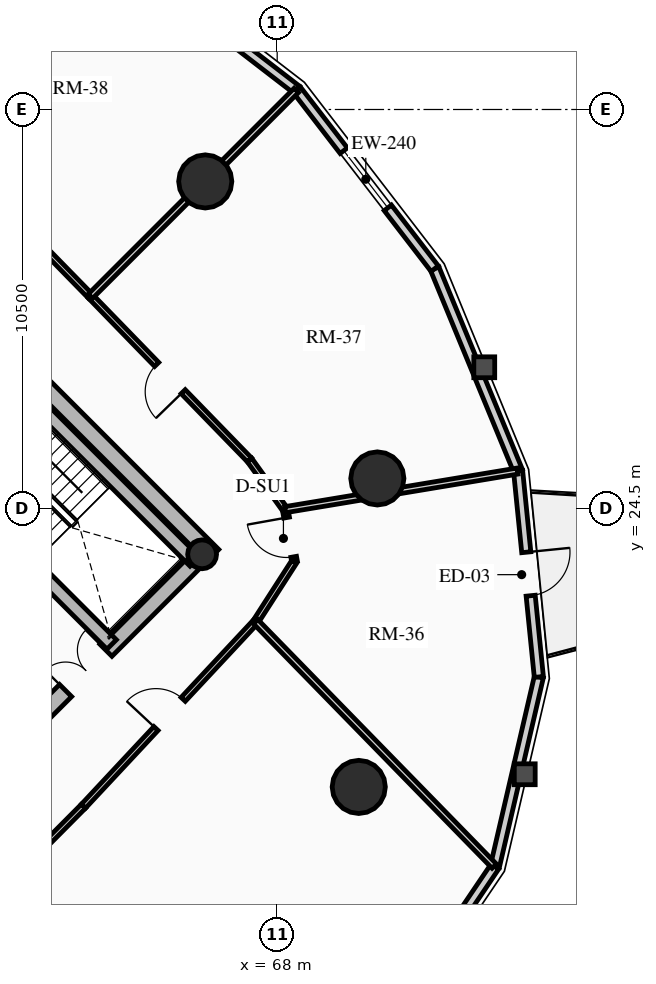
"""IFC4 building model, lengths in metres.
Left out: names, types, materials, properties, quantities, classifications, styles, units other than length and angle.
Written with IfcOpenShell. Run it as: python <this file> out.ifc"""

import sys

from ifc_helpers import new_model, si_unit, direction, frame, frame_2d, origin, origin_2d, place, context, subcontext, project, spatial, rectangle, circle, hollow_circle, extrude, source, transform, mapped, element, fill, save


model = new_model("IFC4")
c1 = context("Model", 3, precision=1e-05, world=origin(), true_north=direction((0.0, 1.0)))
c2 = subcontext(c1, "Body", "Model", "MODEL_VIEW")
j1 = project(units=[si_unit("LENGTHUNIT", "METRE"), si_unit("PLANEANGLEUNIT", "RADIAN")], contexts=[c1])
p1 = place(None, origin())
s1 = spatial("IfcSite", under=j1, at=p1, CompositionType="ELEMENT")
p2 = place(p1, origin())
s2 = spatial("IfcBuilding", under=s1, at=p2, CompositionType="ELEMENT")
p3 = place(p2, frame((0.0, 0.0, 78.88)))
s3 = spatial("IfcBuildingStorey", under=s2, at=p3, CompositionType="ELEMENT", Elevation=78.88)
p4 = place(p3, frame((66.303, 23.263, 0.0), z_axis=(0.0, 0.0, 1.0), x_axis=(-0.707106781187, 0.707106781187, 0.0)))
e1 = element("IfcWall", 1, at=p4, inside=s3, PredefinedType="SHEAR", context=c2, shape_type="SweptSolid", body=[
    extrude(rectangle(XDim=14.2, YDim=0.45, at=frame_2d((7.1, 0.0))), origin(), (0.0, 0.0, 1.0), 2.91),
])
p5 = place(p3, frame((58.578, 15.856, 0.0), z_axis=(0.0, 0.0, 1.0), x_axis=(0.707106781187, 0.707106781187, 0.0)))
e2 = element("IfcWall", 2, at=p5, inside=s3, PredefinedType="SHEAR", context=c2, shape_type="SweptSolid", body=[
    extrude(rectangle(XDim=10.7, YDim=0.45, at=frame_2d((5.35, 0.0))), origin(), (0.0, 0.0, 1.0), 2.91),
])
m1 = source(origin(), c2, "Body", "SweptSolid", [
    extrude(rectangle(XDim=1.5, YDim=2.02, at=frame_2d((0.75, 1.01))), frame((0.0, 0.235, 0.0), z_axis=(0.0, -1.0, 0.0), x_axis=(1.0, 0.0, 0.0)), (0.0, 0.0, 1.0), 0.47),
])
p6 = place(p5, frame((5.45, 0.0, 0.0)))
e3 = element("IfcOpeningElement", 3, at=p6, cuts=e2, PredefinedType="OPENING", context=c2, shape_type="MappedRepresentation", body=[
    mapped(m1, transform((0.0, 0.0, 0.0), x_axis=(1.0, 0.0, 0.0), y_axis=(0.0, 1.0, 0.0), z_axis=(0.0, 0.0, 1.0), scale=1.0)),
])
p7 = place(p3, frame((63.645, 20.922, 0.0), z_axis=(0.0, 0.0, 1.0), x_axis=(-0.707106781187, 0.707106781187, 0.0)))
e4 = element("IfcWall", 4, at=p7, inside=s3, PredefinedType="SHEAR", context=c2, shape_type="SweptSolid", body=[
    extrude(rectangle(XDim=13.75, YDim=0.35, at=frame_2d((6.875, 0.0))), origin(), (0.0, 0.0, 1.0), 2.91),
])
m2 = source(origin(), c2, "Body", "SweptSolid", [
    extrude(rectangle(XDim=1.1, YDim=2.015, at=frame_2d((0.55, 1.007))), frame((0.0, 0.185, 0.0), z_axis=(0.0, -1.0, 0.0), x_axis=(1.0, 0.0, 0.0)), (0.0, 0.0, 1.0), 0.37),
])
p8 = place(p7, frame((10.0, 0.0, 0.0)))
e5 = element("IfcOpeningElement", 5, at=p8, cuts=e4, PredefinedType="OPENING", context=c2, shape_type="MappedRepresentation", body=[
    mapped(m2, transform((0.0, 0.0, 0.0), x_axis=(1.0, 0.0, 0.0), y_axis=(0.0, 1.0, 0.0), z_axis=(0.0, 0.0, 1.0), scale=1.0)),
])
p9 = place(p7, frame((12.0, 0.0, 0.0)))
e6 = element("IfcOpeningElement", 6, at=p9, cuts=e4, PredefinedType="OPENING", context=c2, shape_type="MappedRepresentation", body=[
    mapped(m2, transform((0.0, 0.0, 0.0), x_axis=(1.0, 0.0, 0.0), y_axis=(0.0, 1.0, 0.0), z_axis=(0.0, 0.0, 1.0), scale=1.0)),
])
m3 = source(origin(), c2, "Body", "SweptSolid", [
    extrude(rectangle(XDim=1.15, YDim=2.02, at=frame_2d((0.575, 1.01))), frame((0.0, 0.185, 0.0), z_axis=(0.0, -1.0, 0.0), x_axis=(1.0, 0.0, 0.0)), (0.0, 0.0, 1.0), 0.37),
])
p10 = place(p7, frame((5.305, 0.0, 0.0)))
e7 = element("IfcOpeningElement", 7, at=p10, cuts=e4, PredefinedType="OPENING", context=c2, shape_type="MappedRepresentation", body=[
    mapped(m3, transform((0.0, 0.0, 0.0), x_axis=(1.0, 0.0, 0.0), y_axis=(0.0, 1.0, 0.0), z_axis=(0.0, 0.0, 1.0), scale=1.0)),
])
p11 = place(p3, frame((65.83, 23.107, 0.0), z_axis=(0.0, 0.0, 1.0), x_axis=(-0.707088616009, 0.707124945897, 0.0)))
e8 = element("IfcWall", 8, at=p11, inside=s3, PredefinedType="SHEAR", context=c2, shape_type="SweptSolid", body=[
    extrude(rectangle(XDim=6.72, YDim=0.35, at=frame_2d((3.36, 0.0))), origin(), (0.0, 0.0, 1.0), 2.91),
])
p12 = place(p3, frame((66.024, 23.294, 0.0), z_axis=(0.0, 0.0, 1.0), x_axis=(0.707106781187, 0.707106781187, 0.0)))
e9 = element("IfcColumn", 9, at=p12, inside=s3, PredefinedType="COLUMN", context=c2, shape_type="SweptSolid", body=[
    extrude(hollow_circle(Radius=0.38, WallThickness=0.032, at=origin_2d()), origin(), (0.0, 0.0, 1.0), 2.91),
])
for number, where, z_axis, x_axis in (
    (10, (66.107, 33.107, 0.0), (0.0, 0.0, 1.0), (1.0, 0.0, 0.0)),
    (11, (70.146, 17.173, 0.0), (0.0, 0.0, 1.0), (1.0, 0.0, 0.0)),
    (12, (70.635, 25.291, 0.0), (0.0, 0.0, 1.0), (1.0, 0.0, 0.0)),
):
    element("IfcColumn", number, at=place(p3, frame(where, z_axis=z_axis, x_axis=x_axis)), inside=s3, PredefinedType="USERDEFINED", context=c2, shape_type="SweptSolid", body=[
        extrude(circle(Radius=0.7, at=origin_2d()), origin(), (0.0, 0.0, 1.0), 2.91),
    ])
p13 = place(p3, frame((63.811, 39.145, 0.0), z_axis=(0.0, 0.0, 1.0), x_axis=(0.791982052206, -0.61054437102, 0.0)))
e13 = element("IfcWall", 13, at=p13, inside=s3, PredefinedType="SOLIDWALL", context=c2, shape_type="SweptSolid", body=[
    extrude(rectangle(XDim=5.942, YDim=0.24, at=frame_2d((2.971, 0.0))), origin(), (0.0, 0.0, 1.0), 2.179),
])
p14 = place(p3, frame((73.729, 15.08, 0.0), z_axis=(0.0, 0.0, 1.0), x_axis=(-0.559572880421, -0.828781148131, 0.0)))
e14 = element("IfcWall", 14, at=p14, inside=s3, PredefinedType="SOLIDWALL", context=c2, shape_type="SweptSolid", body=[
    extrude(rectangle(XDim=4.905, YDim=0.24, at=frame_2d((2.452, 0.0))), origin(), (0.0, 0.0, 1.0), 2.179),
])
m4 = source(origin(), c2, "Body", "SweptSolid", [
    extrude(rectangle(XDim=2.2, YDim=1.35, at=frame_2d((1.1, 0.675))), frame((0.0, 0.13, 0.0), z_axis=(0.0, -1.0, 0.0), x_axis=(1.0, 0.0, 0.0)), (0.0, 0.0, 1.0), 0.26),
])
p15 = place(p14, frame((1.352, 0.0, 0.65)))
e15 = element("IfcOpeningElement", 15, at=p15, cuts=e14, PredefinedType="OPENING", context=c2, shape_type="MappedRepresentation", body=[
    mapped(m4, transform((0.0, 0.0, 0.0), x_axis=(1.0, 0.0, 0.0), y_axis=(0.0, 1.0, 0.0), z_axis=(0.0, 0.0, 1.0), scale=1.0)),
])
p16 = place(p3, frame((74.885, 20.067, 0.0), z_axis=(0.0, 0.0, 1.0), x_axis=(-0.225834725257, -0.974165631126, 0.0)))
e16 = element("IfcWall", 16, at=p16, inside=s3, PredefinedType="SOLIDWALL", context=c2, shape_type="SweptSolid", body=[
    extrude(rectangle(XDim=5.119, YDim=0.24, at=frame_2d((2.56, 0.0))), origin(), (0.0, 0.0, 1.0), 2.179),
])
p17 = place(p3, frame((74.339, 25.487, 0.0), z_axis=(0.0, 0.0, 1.0), x_axis=(0.10015591906, -0.994971754311, 0.0)))
e17 = element("IfcWall", 17, at=p17, inside=s3, PredefinedType="SOLIDWALL", context=c2, shape_type="SweptSolid", body=[
    extrude(rectangle(XDim=5.448, YDim=0.24, at=frame_2d((2.724, 0.0))), origin(), (0.0, 0.0, 1.0), 2.179),
])
m5 = source(origin(), c2, "Body", "SweptSolid", [
    extrude(rectangle(XDim=1.15, YDim=2.005, at=frame_2d((0.575, 1.002))), frame((0.0, 0.13, 0.0), z_axis=(0.0, -1.0, 0.0), x_axis=(1.0, 0.0, 0.0)), (0.0, 0.0, 1.0), 0.26),
])
p18 = place(p17, frame((2.149, 0.0, 0.0)))
e18 = element("IfcOpeningElement", 18, at=p18, cuts=e17, PredefinedType="OPENING", context=c2, shape_type="MappedRepresentation", body=[
    mapped(m5, transform((0.0, 0.0, 0.0), x_axis=(1.0, 0.0, 0.0), y_axis=(0.0, 1.0, 0.0), z_axis=(0.0, 0.0, 1.0), scale=1.0)),
])
p19 = place(p3, frame((72.145, 30.811, 0.0), z_axis=(0.0, 0.0, 1.0), x_axis=(0.381027003055, -0.924563909604, 0.0)))
e19 = element("IfcWall", 19, at=p19, inside=s3, PredefinedType="SOLIDWALL", context=c2, shape_type="SweptSolid", body=[
    extrude(rectangle(XDim=5.758, YDim=0.24, at=frame_2d((2.879, 0.0))), origin(), (0.0, 0.0, 1.0), 2.179),
])
p20 = place(p3, frame((68.517, 35.517, 0.0), z_axis=(0.0, 0.0, 1.0), x_axis=(0.61054437102, -0.791982052206, 0.0)))
e20 = element("IfcWall", 20, at=p20, inside=s3, PredefinedType="SOLIDWALL", context=c2, shape_type="SweptSolid", body=[
    extrude(rectangle(XDim=5.942, YDim=0.24, at=frame_2d((2.971, 0.0))), origin(), (0.0, 0.0, 1.0), 2.179),
])
m6 = source(origin(), c2, "Body", "SweptSolid", [
    extrude(rectangle(XDim=1.9, YDim=1.35, at=frame_2d((0.95, 0.675))), frame((0.0, 0.13, 0.0), z_axis=(0.0, -1.0, 0.0), x_axis=(1.0, 0.0, 0.0)), (0.0, 0.0, 1.0), 0.26),
])
p21 = place(p20, frame((2.021, 0.0, 0.65)))
e21 = element("IfcOpeningElement", 21, at=p21, cuts=e20, PredefinedType="OPENING", context=c2, shape_type="MappedRepresentation", body=[
    mapped(m6, transform((0.0, 0.0, 0.0), x_axis=(1.0, 0.0, 0.0), y_axis=(0.0, 1.0, 0.0), z_axis=(0.0, 0.0, 1.0), scale=1.0)),
])
p22 = place(p3, frame((63.086, 30.086, 0.0), z_axis=(0.0, 0.0, 1.0), x_axis=(-0.699075897379, 0.715047473741, 0.0)))
e22 = element("IfcWall", 22, at=p22, inside=s3, PredefinedType="PARTITIONING", context=c2, shape_type="SweptSolid", body=[
    extrude(rectangle(XDim=6.114, YDim=0.15, at=frame_2d((3.057, 0.0))), origin(), (0.0, 0.0, 1.0), 2.225),
])
p23 = place(p3, frame((60.562, 14.31, 0.0), z_axis=(0.0, 0.0, 1.0), x_axis=(0.704566236161, 0.709638230975, 0.0)))
e23 = element("IfcWall", 23, at=p23, inside=s3, PredefinedType="PARTITIONING", context=c2, shape_type="SweptSolid", body=[
    extrude(rectangle(XDim=3.321, YDim=0.15, at=frame_2d((1.661, 0.0))), origin(), (0.0, 0.0, 1.0), 2.225),
])
p24 = place(p3, frame((62.903, 16.667, 0.0), z_axis=(0.0, 0.0, 1.0), x_axis=(0.682371947497, 0.731005147225, 0.0)))
e24 = element("IfcWall", 24, at=p24, inside=s3, PredefinedType="PARTITIONING", context=c2, shape_type="SweptSolid", body=[
    extrude(rectangle(XDim=6.642, YDim=0.15, at=frame_2d((3.321, 0.0))), origin(), (0.0, 0.0, 1.0), 2.225),
])
m7 = source(origin(), c2, "Body", "SweptSolid", [
    extrude(rectangle(XDim=1.05, YDim=2.015, at=frame_2d((0.525, 1.007))), frame((0.0, 0.085, 0.0), z_axis=(0.0, -1.0, 0.0), x_axis=(1.0, 0.0, 0.0)), (0.0, 0.0, 1.0), 0.17),
])
p25 = place(p24, frame((2.796, 0.0, 0.0)))
e25 = element("IfcOpeningElement", 25, at=p25, cuts=e24, PredefinedType="OPENING", context=c2, shape_type="MappedRepresentation", body=[
    mapped(m7, transform((0.0, 0.0, 0.0), x_axis=(1.0, 0.0, 0.0), y_axis=(0.0, 1.0, 0.0), z_axis=(0.0, 0.0, 1.0), scale=1.0)),
])
p26 = place(p3, frame((67.435, 21.521, 0.0), z_axis=(0.0, 0.0, 1.0), x_axis=(0.540777197838, 0.841165870859, 0.0)))
e26 = element("IfcWall", 26, at=p26, inside=s3, PredefinedType="PARTITIONING", context=c2, shape_type="SweptSolid", body=[
    extrude(rectangle(XDim=1.888, YDim=0.15, at=frame_2d((0.944, 0.0))), origin(), (0.0, 0.0, 1.0), 2.225),
])
p27 = place(p3, frame((68.456, 23.11, 0.0), z_axis=(0.0, 0.0, 1.0), x_axis=(-0.1772522795, 0.984165448191, 0.0)))
e27 = element("IfcWall", 27, at=p27, inside=s3, PredefinedType="PARTITIONING", context=c2, shape_type="SweptSolid", body=[
    extrude(rectangle(XDim=1.382, YDim=0.15, at=frame_2d((0.691, 0.0))), origin(), (0.0, 0.0, 1.0), 2.225),
])
p28 = place(p27, frame((0.12, 0.0, 0.0)))
e28 = element("IfcOpeningElement", 28, at=p28, cuts=e27, PredefinedType="OPENING", context=c2, shape_type="MappedRepresentation", body=[
    mapped(m7, transform((0.0, 0.0, 0.0), x_axis=(1.0, 0.0, 0.0), y_axis=(0.0, 1.0, 0.0), z_axis=(0.0, 0.0, 1.0), scale=1.0)),
])
p29 = place(p3, frame((68.211, 24.469, 0.0), z_axis=(0.0, 0.0, 1.0), x_axis=(-0.583012141368, 0.812463441034, 0.0)))
e29 = element("IfcWall", 29, at=p29, inside=s3, PredefinedType="PARTITIONING", context=c2, shape_type="SweptSolid", body=[
    extrude(rectangle(XDim=1.613, YDim=0.15, at=frame_2d((0.807, 0.0))), origin(), (0.0, 0.0, 1.0), 2.225),
])
p30 = place(p3, frame((67.27, 25.78, 0.0), z_axis=(0.0, 0.0, 1.0), x_axis=(-0.696847842907, 0.717218992942, 0.0)))
e30 = element("IfcWall", 30, at=p30, inside=s3, PredefinedType="PARTITIONING", context=c2, shape_type="SweptSolid", body=[
    extrude(rectangle(XDim=6.004, YDim=0.15, at=frame_2d((3.002, 0.0))), origin(), (0.0, 0.0, 1.0), 2.655),
])
m8 = source(origin(), c2, "Body", "SweptSolid", [
    extrude(rectangle(XDim=1.0, YDim=2.015, at=frame_2d((0.5, 1.007))), frame((0.0, 0.085, 0.0), z_axis=(0.0, -1.0, 0.0), x_axis=(1.0, 0.0, 0.0)), (0.0, 0.0, 1.0), 0.17),
])
p31 = place(p30, frame((2.502, 0.0, 0.0)))
e31 = element("IfcOpeningElement", 31, at=p31, cuts=e30, PredefinedType="OPENING", context=c2, shape_type="MappedRepresentation", body=[
    mapped(m8, transform((0.0, 0.0, 0.0), x_axis=(1.0, 0.0, 0.0), y_axis=(0.0, 1.0, 0.0), z_axis=(0.0, 0.0, 1.0), scale=1.0)),
])
p32 = place(p3, frame((63.086, 30.086, 0.0), z_axis=(0.0, 0.0, 1.0), x_axis=(0.707106781187, 0.707106781187, 0.0)))
e32 = element("IfcWall", 32, at=p32, inside=s3, PredefinedType="PARTITIONING", context=c2, shape_type="SweptSolid", body=[
    extrude(rectangle(XDim=7.661, YDim=0.16, at=frame_2d((3.831, 0.0))), origin(), (0.0, 0.0, 1.0), 2.179),
])
p33 = place(p3, frame((60.562, 14.31, 0.0), z_axis=(0.0, 0.0, 1.0), x_axis=(0.725582293335, -0.688135404989, 0.0)))
e33 = element("IfcWall", 33, at=p33, inside=s3, PredefinedType="PARTITIONING", context=c2, shape_type="SweptSolid", body=[
    extrude(rectangle(XDim=8.749, YDim=0.16, at=frame_2d((4.375, 0.0))), origin(), (0.0, 0.0, 1.0), 2.179),
])
p34 = place(p3, frame((67.435, 21.521, 0.0), z_axis=(0.0, 0.0, 1.0), x_axis=(0.6983880073, -0.715719352302, 0.0)))
e34 = element("IfcWall", 34, at=p34, inside=s3, PredefinedType="PARTITIONING", context=c2, shape_type="SweptSolid", body=[
    extrude(rectangle(XDim=8.987, YDim=0.16, at=frame_2d((4.494, 0.0))), origin(), (0.0, 0.0, 1.0), 2.179),
])
p35 = place(p3, frame((68.211, 24.469, 0.0), z_axis=(0.0, 0.0, 1.0), x_axis=(0.986479033329, 0.163887512651, 0.0)))
e35 = element("IfcWall", 35, at=p35, inside=s3, PredefinedType="PARTITIONING", context=c2, shape_type="SweptSolid", body=[
    extrude(rectangle(XDim=6.193, YDim=0.16, at=frame_2d((3.096, 0.0))), origin(), (0.0, 0.0, 1.0), 2.179),
])
m9 = source(origin(), c2, "Body", "SweptSolid", [
    extrude(rectangle(XDim=1.15, YDim=2.005, at=frame_2d((0.575, 1.002))), frame((0.0, 0.025, 0.0), z_axis=(0.0, -1.0, 0.0), x_axis=(1.0, 0.0, 0.0)), (0.0, 0.0, 1.0), 0.05),
])
p36 = place(p18, origin())
e36 = element("IfcDoor", 36, at=p36, inside=s3, OperationType="SINGLE_SWING_LEFT", PredefinedType="DOOR", context=c2, shape_type="MappedRepresentation", body=[
    mapped(m9, transform((0.0, 0.0, 0.0), x_axis=(1.0, 0.0, 0.0), y_axis=(0.0, 1.0, 0.0), z_axis=(0.0, 0.0, 1.0), scale=1.0)),
])
fill(e18, e36)
m10 = source(origin(), c2, "Body", "SweptSolid", [
    extrude(rectangle(XDim=1.9, YDim=1.35, at=frame_2d((0.95, 0.675))), frame((0.0, 0.03, 0.0), z_axis=(0.0, -1.0, 0.0), x_axis=(1.0, 0.0, 0.0)), (0.0, 0.0, 1.0), 0.06),
])
p37 = place(p21, origin())
e37 = element("IfcWindow", 37, at=p37, inside=s3, PartitioningType="DOUBLE_PANEL_VERTICAL", PredefinedType="WINDOW", context=c2, shape_type="MappedRepresentation", body=[
    mapped(m10, transform((0.0, 0.0, 0.0), x_axis=(1.0, 0.0, 0.0), y_axis=(0.0, 1.0, 0.0), z_axis=(0.0, 0.0, 1.0), scale=1.0)),
])
fill(e21, e37)
m11 = source(origin(), c2, "Body", "SweptSolid", [
    extrude(rectangle(XDim=1.5, YDim=2.02, at=frame_2d((0.75, 1.01))), frame((0.0, 0.025, 0.0), z_axis=(0.0, -1.0, 0.0), x_axis=(1.0, 0.0, 0.0)), (0.0, 0.0, 1.0), 0.05),
])
p38 = place(p6, origin())
e38 = element("IfcDoor", 38, at=p38, inside=s3, OperationType="DOUBLE_DOOR_SINGLE_SWING", PredefinedType="DOOR", context=c2, shape_type="MappedRepresentation", body=[
    mapped(m11, transform((0.0, 0.0, 0.0), x_axis=(1.0, 0.0, 0.0), y_axis=(0.0, 1.0, 0.0), z_axis=(0.0, 0.0, 1.0), scale=1.0)),
])
fill(e3, e38)
m12 = source(origin(), c2, "Body", "SweptSolid", [
    extrude(rectangle(XDim=1.05, YDim=2.015, at=frame_2d((0.525, 1.007))), frame((0.0, 0.025, 0.0), z_axis=(0.0, -1.0, 0.0), x_axis=(1.0, 0.0, 0.0)), (0.0, 0.0, 1.0), 0.05),
])
p39 = place(p25, origin())
e39 = element("IfcDoor", 39, at=p39, inside=s3, OperationType="SINGLE_SWING_LEFT", PredefinedType="DOOR", context=c2, shape_type="MappedRepresentation", body=[
    mapped(m12, transform((0.0, 0.0, 0.0), x_axis=(1.0, 0.0, 0.0), y_axis=(0.0, 1.0, 0.0), z_axis=(0.0, 0.0, 1.0), scale=1.0)),
])
fill(e25, e39)
p40 = place(p28, origin())
e40 = element("IfcDoor", 40, at=p40, inside=s3, OperationType="SINGLE_SWING_RIGHT", PredefinedType="DOOR", context=c2, shape_type="MappedRepresentation", body=[
    mapped(m12, transform((0.0, 0.0, 0.0), x_axis=(1.0, 0.0, 0.0), y_axis=(0.0, 1.0, 0.0), z_axis=(0.0, 0.0, 1.0), scale=1.0)),
])
fill(e28, e40)
m13 = source(origin(), c2, "Body", "SweptSolid", [
    extrude(rectangle(XDim=1.0, YDim=2.015, at=frame_2d((0.5, 1.007))), frame((0.0, 0.025, 0.0), z_axis=(0.0, -1.0, 0.0), x_axis=(1.0, 0.0, 0.0)), (0.0, 0.0, 1.0), 0.05),
])
p41 = place(p31, origin())
e41 = element("IfcDoor", 41, at=p41, inside=s3, OperationType="SINGLE_SWING_LEFT", PredefinedType="DOOR", context=c2, shape_type="MappedRepresentation", body=[
    mapped(m13, transform((0.0, 0.0, 0.0), x_axis=(1.0, 0.0, 0.0), y_axis=(0.0, 1.0, 0.0), z_axis=(0.0, 0.0, 1.0), scale=1.0)),
])
fill(e31, e41)
save(model, sys.argv[1])
